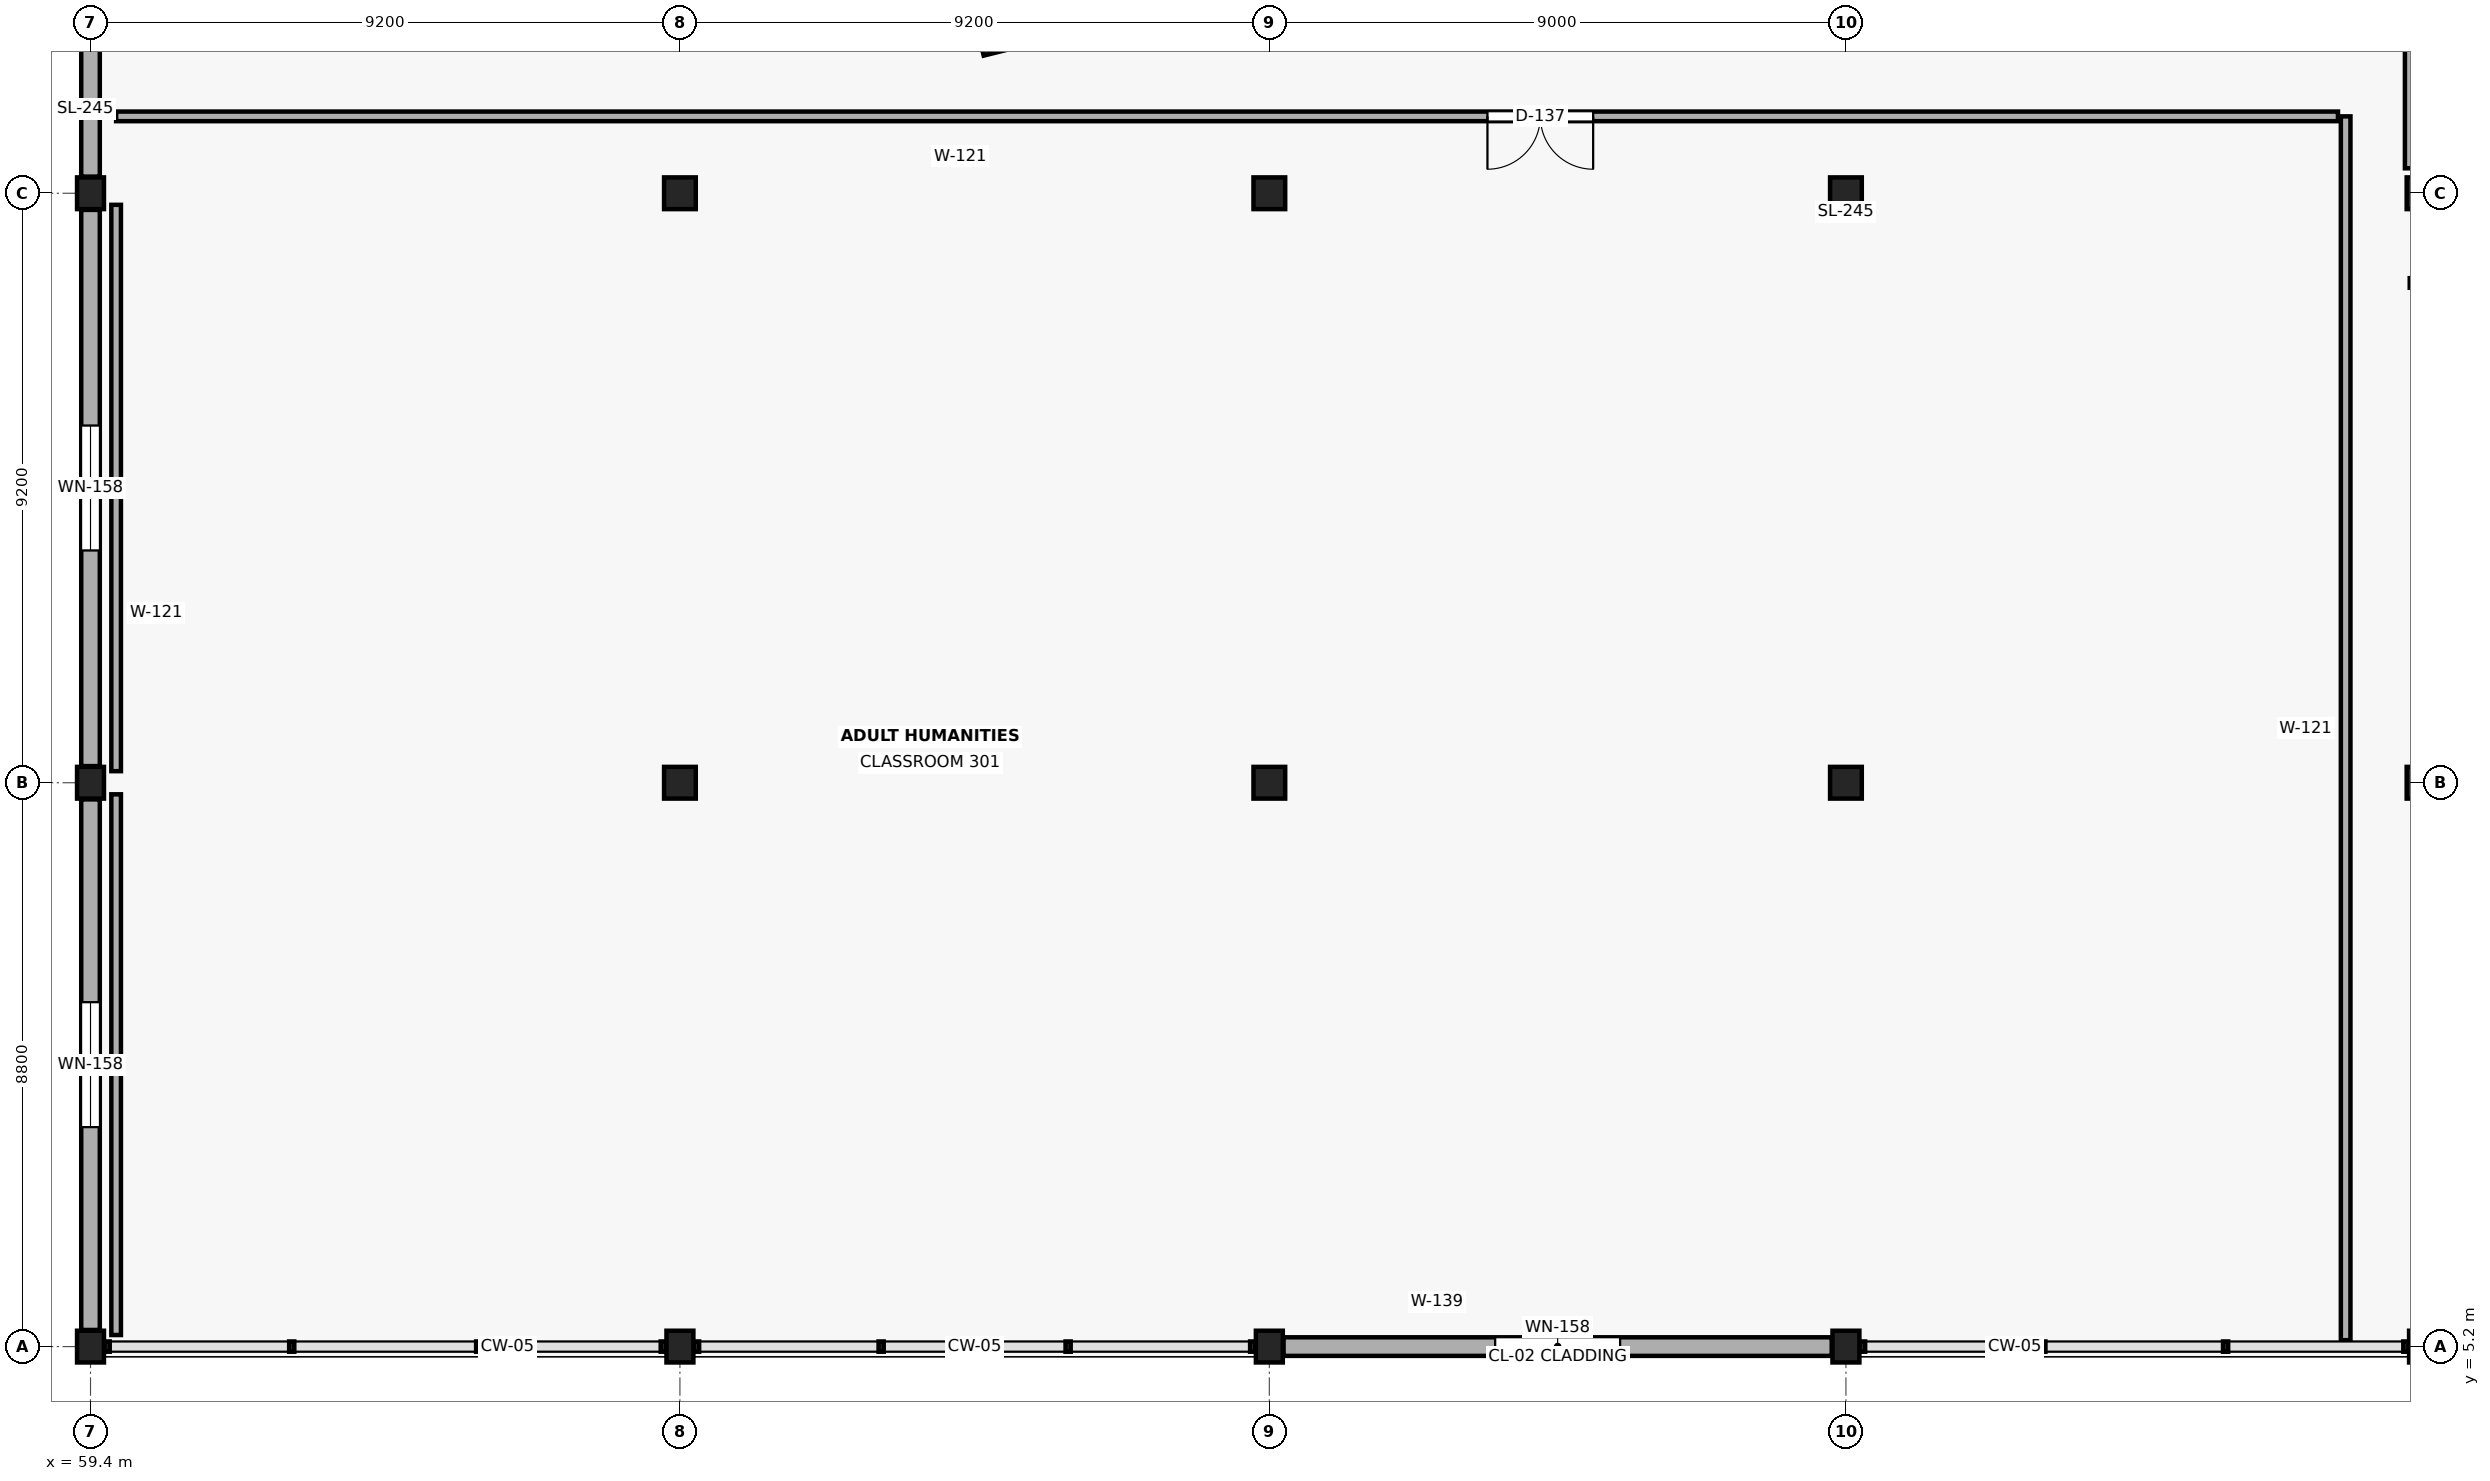
"""IFC4 building model, lengths in metres.
Left out: names, types, materials, properties, quantities, classifications, styles, units other than length and angle.
Written with IfcOpenShell. Run it as: python <this file> out.ifc"""

import sys

from ifc_helpers import new_model, si_unit, direction, frame, frame_2d, origin, origin_2d, place, context, subcontext, project, spatial, rectangle, i_section, extrude, element, fill, save


model = new_model("IFC4")
c1 = context("Model", 3, precision=1e-05, world=origin(), true_north=direction((0.0, 1.0)))
c2 = subcontext(c1, "Body", "Model", "MODEL_VIEW")
j1 = project(units=[si_unit("LENGTHUNIT", "METRE"), si_unit("PLANEANGLEUNIT", "RADIAN")], contexts=[c1])
p1 = place(None, origin())
s1 = spatial("IfcSite", under=j1, at=p1, CompositionType="ELEMENT")
p2 = place(p1, origin())
s2 = spatial("IfcBuilding", under=s1, at=p2, CompositionType="ELEMENT")
p3 = place(p2, frame((0.0, 0.0, 14.4)))
s3 = spatial("IfcBuildingStorey", under=s2, at=p3, CompositionType="ELEMENT", Elevation=14.4)
for number, where, z_axis, x_axis in (
    (1, (59.4, 5.2, 0.0), (0.0, 0.0, 1.0), (1.0, 0.0, 0.0)),
    (2, (59.4, 14.0, 0.0), (0.0, 0.0, 1.0), (1.0, 0.0, 0.0)),
    (3, (59.4, 23.2, 0.0), (0.0, 0.0, 1.0), (1.0, 0.0, 0.0)),
    (4, (68.6, 5.2, 0.0), (0.0, 0.0, 1.0), (1.0, 0.0, 0.0)),
):
    element("IfcColumn", number, at=place(p3, frame(where, z_axis=z_axis, x_axis=x_axis)), inside=s3, PredefinedType="COLUMN", context=c2, shape_type="SweptSolid", body=[
        extrude(rectangle(XDim=0.42, YDim=0.495, at=origin_2d()), origin(), (0.0, 0.0, 1.0), 3.9),
    ])
for number, where, z_axis, x_axis in (
    (5, (68.6, 14.0, 0.0), (0.0, 0.0, 1.0), (1.0, 0.0, 0.0)),
    (6, (68.6, 23.2, 0.0), (0.0, 0.0, 1.0), (1.0, 0.0, 0.0)),
):
    element("IfcColumn", number, at=place(p3, frame(where, z_axis=z_axis, x_axis=x_axis)), inside=s3, PredefinedType="COLUMN", context=c2, shape_type="SweptSolid", body=[
        extrude(rectangle(XDim=0.495, YDim=0.495, at=origin_2d()), origin(), (0.0, 0.0, 1.0), 3.9),
    ])
p4 = place(p3, frame((77.8, 5.2, 0.0), z_axis=(0.0, 0.0, 1.0), x_axis=(1.0, 0.0, 0.0)))
e7 = element("IfcColumn", 7, at=p4, inside=s3, PredefinedType="COLUMN", context=c2, shape_type="SweptSolid", body=[
    extrude(rectangle(XDim=0.42, YDim=0.495, at=origin_2d()), origin(), (0.0, 0.0, 1.0), 3.9),
])
for number, where, z_axis, x_axis in (
    (8, (77.8, 14.0, 0.0), (0.0, 0.0, 1.0), (1.0, 0.0, 0.0)),
    (9, (77.8, 23.2, 0.0), (0.0, 0.0, 1.0), (1.0, 0.0, 0.0)),
):
    element("IfcColumn", number, at=place(p3, frame(where, z_axis=z_axis, x_axis=x_axis)), inside=s3, PredefinedType="COLUMN", context=c2, shape_type="SweptSolid", body=[
        extrude(rectangle(XDim=0.495, YDim=0.495, at=origin_2d()), origin(), (0.0, 0.0, 1.0), 3.9),
    ])
p5 = place(p3, frame((86.8, 5.2, 0.0), z_axis=(0.0, 0.0, 1.0), x_axis=(1.0, 0.0, 0.0)))
e10 = element("IfcColumn", 10, at=p5, inside=s3, PredefinedType="COLUMN", context=c2, shape_type="SweptSolid", body=[
    extrude(rectangle(XDim=0.42, YDim=0.495, at=origin_2d()), origin(), (0.0, 0.0, 1.0), 3.9),
])
for number, where, z_axis, x_axis in (
    (11, (86.8, 14.0, 0.0), (0.0, 0.0, 1.0), (1.0, 0.0, 0.0)),
    (12, (86.8, 23.2, 0.0), (0.0, 0.0, 1.0), (1.0, 0.0, 0.0)),
):
    element("IfcColumn", number, at=place(p3, frame(where, z_axis=z_axis, x_axis=x_axis)), inside=s3, PredefinedType="COLUMN", context=c2, shape_type="SweptSolid", body=[
        extrude(rectangle(XDim=0.495, YDim=0.495, at=origin_2d()), origin(), (0.0, 0.0, 1.0), 3.9),
    ])
p6 = place(p3, frame((95.8, 5.2, 0.0), z_axis=(0.0, 0.0, 1.0), x_axis=(1.0, 0.0, 0.0)))
e13 = element("IfcColumn", 13, at=p6, inside=s3, PredefinedType="COLUMN", context=c2, shape_type="SweptSolid", body=[
    extrude(rectangle(XDim=0.42, YDim=0.495, at=origin_2d()), origin(), (0.0, 0.0, 1.0), 3.9),
])
for number, where, z_axis, x_axis in (
    (14, (95.8, 14.0, 0.0), (0.0, 0.0, 1.0), (1.0, 0.0, 0.0)),
    (15, (95.8, 23.2, 0.0), (0.0, 0.0, 1.0), (1.0, 0.0, 0.0)),
):
    element("IfcColumn", number, at=place(p3, frame(where, z_axis=z_axis, x_axis=x_axis)), inside=s3, PredefinedType="COLUMN", context=c2, shape_type="SweptSolid", body=[
        extrude(rectangle(XDim=0.495, YDim=0.495, at=origin_2d()), origin(), (0.0, 0.0, 1.0), 3.9),
    ])
p7 = place(p3, frame((73.477, 25.565, 0.0), z_axis=(0.0, 0.0, 1.0), x_axis=(0.970295726276, 0.2419218956, 0.0)))
e16 = element("IfcColumn", 16, at=p7, inside=s3, PredefinedType="COLUMN", context=c2, shape_type="SweptSolid", body=[
    extrude(i_section(OverallWidth=0.369, OverallDepth=0.356, WebThickness=0.011, FlangeThickness=0.018, at=origin_2d()), origin(), (0.0, 0.0, 1.0), 3.9),
])
p8 = place(p3, frame((86.578, 5.2, 0.0), z_axis=(0.0, 0.0, 1.0), x_axis=(-1.0, 0.0, 0.0)))
e17 = element("IfcWall", 17, at=p8, inside=s3, PredefinedType="SOLIDWALL", context=c2, shape_type="SweptSolid", body=[
    extrude(rectangle(XDim=8.556, YDim=0.29, at=frame_2d((4.278, 0.0))), origin(), (0.0, 0.0, 1.0), 2.855),
])
p9 = place(p8, frame((3.303, 0.0, 0.85)))
e18 = element("IfcOpeningElement", 18, at=p9, cuts=e17, PredefinedType="OPENING", context=c2, shape_type="SweptSolid", body=[
    extrude(rectangle(XDim=1.95, YDim=1.9, at=frame_2d((0.975, 0.95))), frame((0.0, 0.157, 0.0), z_axis=(0.0, -1.0, 0.0), x_axis=(1.0, 0.0, 0.0)), (0.0, 0.0, 1.0), 0.314),
])
p10 = place(p3, frame((59.4, 5.459, 0.0), z_axis=(0.0, 0.0, 1.0), x_axis=(0.0, 1.0, 0.0)))
e19 = element("IfcWall", 19, at=p10, inside=s3, PredefinedType="SOLIDWALL", context=c2, shape_type="SweptSolid", body=[
    extrude(rectangle(XDim=8.281, YDim=0.29, at=frame_2d((4.141, 0.0))), origin(), (0.0, 0.0, 1.0), 2.855),
])
p11 = place(p10, frame((3.166, 0.0, 0.85)))
e20 = element("IfcOpeningElement", 20, at=p11, cuts=e19, PredefinedType="OPENING", context=c2, shape_type="SweptSolid", body=[
    extrude(rectangle(XDim=1.95, YDim=1.9, at=frame_2d((0.975, 0.95))), frame((0.0, 0.157, 0.0), z_axis=(0.0, -1.0, 0.0), x_axis=(1.0, 0.0, 0.0)), (0.0, 0.0, 1.0), 0.314),
])
p12 = place(p3, frame((59.4, 14.26, 0.0), z_axis=(0.0, 0.0, 1.0), x_axis=(0.0, 1.0, 0.0)))
e21 = element("IfcWall", 21, at=p12, inside=s3, PredefinedType="SOLIDWALL", context=c2, shape_type="SweptSolid", body=[
    extrude(rectangle(XDim=8.681, YDim=0.29, at=frame_2d((4.34, 0.0))), origin(), (0.0, 0.0, 1.0), 2.855),
])
p13 = place(p12, frame((3.365, 0.0, 0.85)))
e22 = element("IfcOpeningElement", 22, at=p13, cuts=e21, PredefinedType="OPENING", context=c2, shape_type="SweptSolid", body=[
    extrude(rectangle(XDim=1.95, YDim=1.9, at=frame_2d((0.975, 0.95))), frame((0.0, 0.157, 0.0), z_axis=(0.0, -1.0, 0.0), x_axis=(1.0, 0.0, 0.0)), (0.0, 0.0, 1.0), 0.314),
])
p14 = place(p3, frame((59.4, 23.459, 0.0), z_axis=(0.0, 0.0, 1.0), x_axis=(0.0, 1.0, 0.0)))
e23 = element("IfcWall", 23, at=p14, inside=s3, PredefinedType="SOLIDWALL", context=c2, shape_type="SweptSolid", body=[
    extrude(rectangle(XDim=8.281, YDim=0.29, at=frame_2d((4.141, 0.0))), origin(), (0.0, 0.0, 1.0), 2.855),
])
p15 = place(p14, frame((3.166, 0.0, 0.85)))
e24 = element("IfcOpeningElement", 24, at=p15, cuts=e23, PredefinedType="OPENING", context=c2, shape_type="SweptSolid", body=[
    extrude(rectangle(XDim=1.95, YDim=1.9, at=frame_2d((0.975, 0.95))), frame((0.0, 0.157, 0.0), z_axis=(0.0, -1.0, 0.0), x_axis=(1.0, 0.0, 0.0)), (0.0, 0.0, 1.0), 0.314),
])
p16 = place(p3, frame((94.6, 5.3, 0.0), z_axis=(0.0, 0.0, 1.0), x_axis=(0.0, 1.0, 0.0)))
e25 = element("IfcWall", 25, at=p16, inside=s3, PredefinedType="PARTITIONING", context=c2, shape_type="SweptSolid", body=[
    extrude(rectangle(XDim=19.1, YDim=0.15, at=frame_2d((9.55, 0.0))), origin(), (0.0, 0.0, 1.0), 3.655),
])
p17 = place(p3, frame((94.48, 24.4, 0.0), z_axis=(0.0, 0.0, 1.0), x_axis=(-1.0, 0.0, 0.0)))
e26 = element("IfcWall", 26, at=p17, inside=s3, PredefinedType="PARTITIONING", context=c2, shape_type="SweptSolid", body=[
    extrude(rectangle(XDim=34.68, YDim=0.15, at=frame_2d((17.34, 0.0))), origin(), (0.0, 0.0, 1.0), 3.655),
])
p18 = place(p17, frame((11.625, 0.0, 0.0)))
e27 = element("IfcOpeningElement", 27, at=p18, cuts=e26, PredefinedType="OPENING", context=c2, shape_type="SweptSolid", body=[
    extrude(rectangle(XDim=1.65, YDim=2.35, at=frame_2d((0.825, 1.175))), frame((0.0, 0.087, 0.0), z_axis=(0.0, -1.0, 0.0), x_axis=(1.0, 0.0, 0.0)), (0.0, 0.0, 1.0), 0.174),
])
p19 = place(p3, frame((59.8, 23.02, 0.0), z_axis=(0.0, 0.0, 1.0), x_axis=(0.0, -1.0, 0.0)))
e28 = element("IfcWall", 28, at=p19, inside=s3, PredefinedType="PARTITIONING", context=c2, shape_type="SweptSolid", body=[
    extrude(rectangle(XDim=8.839, YDim=0.15, at=frame_2d((4.419, 0.0))), origin(), (0.0, 0.0, 1.0), 3.655),
])
p20 = place(p3, frame((59.8, 13.819, 0.0), z_axis=(0.0, 0.0, 1.0), x_axis=(0.0, -1.0, 0.0)))
e29 = element("IfcWall", 29, at=p20, inside=s3, PredefinedType="PARTITIONING", context=c2, shape_type="SweptSolid", body=[
    extrude(rectangle(XDim=8.439, YDim=0.15, at=frame_2d((4.219, 0.0))), origin(), (0.0, 0.0, 1.0), 3.655),
])
p21 = place(p3, frame((95.6, 31.61, 0.0), z_axis=(0.0, 0.0, 1.0), x_axis=(0.0, -1.0, 0.0)))
e30 = element("IfcWall", 30, at=p21, inside=s3, PredefinedType="PARTITIONING", context=c2, shape_type="SweptSolid", body=[
    extrude(rectangle(XDim=8.021, YDim=0.15, at=frame_2d((4.01, 0.0))), origin(), (0.0, 0.0, 1.0), 3.655),
])
p22 = place(p9, origin())
e31 = element("IfcWindow", 31, at=p22, inside=s3, PartitioningType="SINGLE_PANEL", PredefinedType="WINDOW", context=c2, shape_type="SweptSolid", body=[
    extrude(rectangle(XDim=1.95, YDim=1.9, at=frame_2d((0.975, 0.95))), frame((0.0, 0.03, 0.0), z_axis=(0.0, -1.0, 0.0), x_axis=(1.0, 0.0, 0.0)), (0.0, 0.0, 1.0), 0.06),
])
fill(e18, e31)
p23 = place(p11, origin())
e32 = element("IfcWindow", 32, at=p23, inside=s3, PartitioningType="SINGLE_PANEL", PredefinedType="WINDOW", context=c2, shape_type="SweptSolid", body=[
    extrude(rectangle(XDim=1.95, YDim=1.9, at=frame_2d((0.975, 0.95))), frame((0.0, 0.03, 0.0), z_axis=(0.0, -1.0, 0.0), x_axis=(1.0, 0.0, 0.0)), (0.0, 0.0, 1.0), 0.06),
])
fill(e20, e32)
p24 = place(p13, origin())
e33 = element("IfcWindow", 33, at=p24, inside=s3, PartitioningType="SINGLE_PANEL", PredefinedType="WINDOW", context=c2, shape_type="SweptSolid", body=[
    extrude(rectangle(XDim=1.95, YDim=1.9, at=frame_2d((0.975, 0.95))), frame((0.0, 0.03, 0.0), z_axis=(0.0, -1.0, 0.0), x_axis=(1.0, 0.0, 0.0)), (0.0, 0.0, 1.0), 0.06),
])
fill(e22, e33)
p25 = place(p18, origin())
e34 = element("IfcDoor", 34, at=p25, inside=s3, OperationType="DOUBLE_DOOR_SINGLE_SWING", PredefinedType="DOOR", context=c2, shape_type="SweptSolid", body=[
    extrude(rectangle(XDim=1.65, YDim=2.35, at=frame_2d((0.825, 1.175))), frame((0.0, 0.025, 0.0), z_axis=(0.0, -1.0, 0.0), x_axis=(1.0, 0.0, 0.0)), (0.0, 0.0, 1.0), 0.05),
])
fill(e27, e34)
save(model, sys.argv[1])
